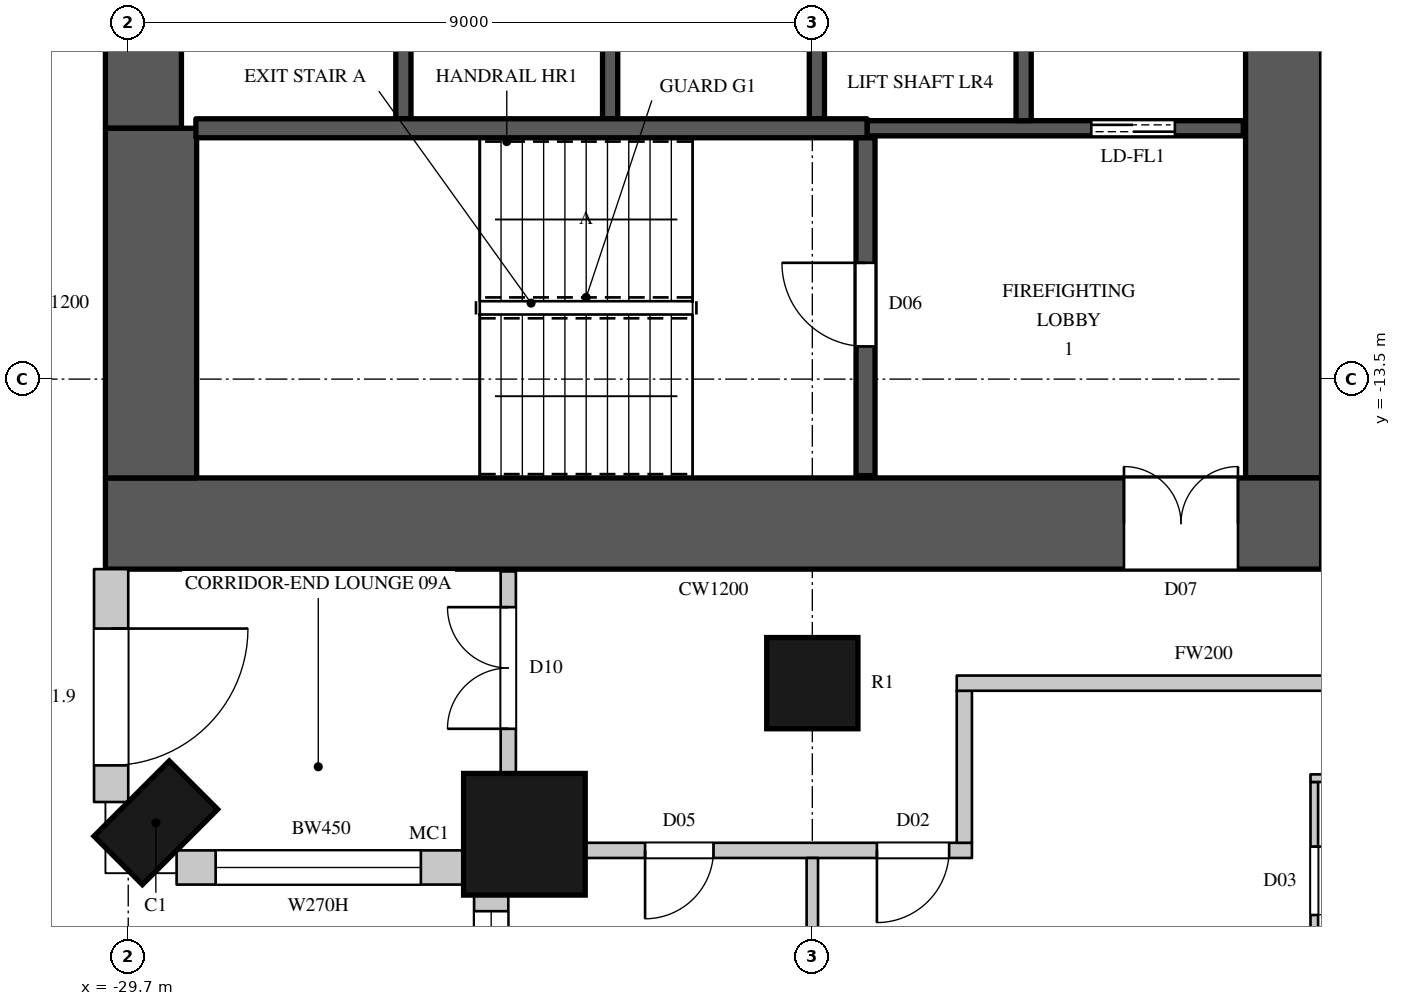
"""IFC4 building model, lengths in metres.
Left out: names, types, materials, properties, quantities, classifications, styles, units other than length and angle.
Written with IfcOpenShell. Run it as: python <this file> out.ifc"""

import sys

from ifc_helpers import new_model, si_unit, direction, frame, frame_2d, origin, origin_2d, place, context, subcontext, project, spatial, rectangle, circle, extrude, element, fill, save


model = new_model("IFC4")
c1 = context("Model", 3, precision=1e-05, world=origin(), true_north=direction((0.0, 1.0)))
c2 = subcontext(c1, "Body", "Model", "MODEL_VIEW")
j1 = project(units=[si_unit("LENGTHUNIT", "METRE"), si_unit("PLANEANGLEUNIT", "RADIAN")], contexts=[c1])
p1 = place(None, origin())
s1 = spatial("IfcSite", under=j1, at=p1, CompositionType="ELEMENT")
p2 = place(p1, origin())
s2 = spatial("IfcBuilding", under=s1, at=p2, CompositionType="ELEMENT")
p3 = place(p2, frame((0.0, 0.0, 62.7)))
s3 = spatial("IfcBuildingStorey", under=s2, at=p3, CompositionType="ELEMENT", Elevation=62.7)
p4 = place(p3, frame((-29.337, -19.337, 0.0), z_axis=(0.0, 0.0, 1.0), x_axis=(0.707106781187, -0.707106781187, 0.0)))
e1 = element("IfcColumn", 1, at=p4, inside=s3, PredefinedType="COLUMN", context=c2, shape_type="SweptSolid", body=[
    extrude(rectangle(XDim=0.9, YDim=1.4, at=origin_2d()), origin(), (0.0, 0.0, 1.0), 3.6),
])
p5 = place(p3, frame((-24.488, -19.488, 0.0), z_axis=(0.0, 0.0, 1.0), x_axis=(1.0, 0.0, 0.0)))
e2 = element("IfcColumn", 2, at=p5, inside=s3, PredefinedType="COLUMN", context=c2, shape_type="SweptSolid", body=[
    extrude(circle(Radius=0.8, at=origin_2d()), origin(), (0.0, 0.0, 1.0), 3.6),
])
p6 = place(p3, frame((-20.7, -17.5, 0.0), z_axis=(0.0, 0.0, 1.0), x_axis=(1.0, 0.0, 0.0)))
e3 = element("IfcColumn", 3, at=p6, inside=s3, PredefinedType="COLUMN", context=c2, shape_type="SweptSolid", body=[
    extrude(circle(Radius=0.6, at=origin_2d()), origin(), (0.0, 0.0, 1.0), 3.6),
])
p7 = place(p3, frame((-29.925, -16.0, 0.0), z_axis=(0.0, 0.0, 1.0), x_axis=(0.0, -1.0, 0.0)))
e4 = element("IfcWall", 4, at=p7, inside=s3, PredefinedType="SOLIDWALL", context=c2, shape_type="SweptSolid", body=[
    extrude(rectangle(XDim=3.064, YDim=0.45, at=frame_2d((1.532, 0.0))), origin(), (0.0, 0.0, 1.0), 3.3),
])
p8 = place(p7, frame((0.782, 0.0, 0.0)))
e5 = element("IfcOpeningElement", 5, at=p8, cuts=e4, PredefinedType="OPENING", context=c2, shape_type="SweptSolid", body=[
    extrude(rectangle(XDim=1.8, YDim=2.4, at=frame_2d((0.9, 1.2))), frame((0.0, 0.235, 0.0), z_axis=(0.0, -1.0, 0.0), x_axis=(1.0, 0.0, 0.0)), (0.0, 0.0, 1.0), 0.47),
])
p9 = place(p3, frame((-29.064, -19.925, 0.0), z_axis=(0.0, 0.0, 1.0), x_axis=(1.0, 0.0, 0.0)))
e6 = element("IfcWall", 6, at=p9, inside=s3, PredefinedType="SOLIDWALL", context=c2, shape_type="SweptSolid", body=[
    extrude(rectangle(XDim=3.805, YDim=0.45, at=frame_2d((1.903, 0.0))), origin(), (0.0, 0.0, 1.0), 3.3),
])
p10 = place(p9, frame((0.514, 0.0, 1.05)))
e7 = element("IfcOpeningElement", 7, at=p10, cuts=e6, PredefinedType="OPENING", context=c2, shape_type="SweptSolid", body=[
    extrude(rectangle(XDim=2.7, YDim=2.0, at=frame_2d((1.35, 1.0))), frame((0.0, 0.235, 0.0), z_axis=(0.0, -1.0, 0.0), x_axis=(1.0, 0.0, 0.0)), (0.0, 0.0, 1.0), 0.47),
])
p11 = place(p3, frame((-24.925, -20.259, 0.0), z_axis=(0.0, 0.0, 1.0), x_axis=(0.0, -1.0, 0.0)))
e8 = element("IfcWall", 8, at=p11, inside=s3, PredefinedType="SOLIDWALL", context=c2, shape_type="SweptSolid", body=[
    extrude(rectangle(XDim=1.792, YDim=0.45, at=frame_2d((0.896, 0.0))), origin(), (0.0, 0.0, 1.0), 3.3),
])
p12 = place(p11, frame((0.241, 0.0, 1.05)))
e9 = element("IfcOpeningElement", 9, at=p12, cuts=e8, PredefinedType="OPENING", context=c2, shape_type="SweptSolid", body=[
    extrude(rectangle(XDim=1.2, YDim=2.0, at=frame_2d((0.6, 1.0))), frame((0.0, 0.235, 0.0), z_axis=(0.0, -1.0, 0.0), x_axis=(1.0, 0.0, 0.0)), (0.0, 0.0, 1.0), 0.47),
])
p13 = place(p3, frame((-30.0, -15.4, 0.0), z_axis=(0.0, 0.0, 1.0), x_axis=(1.0, 0.0, 0.0)))
e10 = element("IfcWall", 10, at=p13, inside=s3, PredefinedType="SHEAR", context=c2, shape_type="SweptSolid", body=[
    extrude(rectangle(XDim=16.0, YDim=1.2, at=frame_2d((8.0, 0.0))), origin(), (0.0, 0.0, 1.0), 3.6),
])
p14 = place(p13, frame((13.4, 0.0, 0.0)))
e11 = element("IfcOpeningElement", 11, at=p14, cuts=e10, PredefinedType="OPENING", context=c2, shape_type="SweptSolid", body=[
    extrude(rectangle(XDim=1.5, YDim=2.4, at=frame_2d((0.75, 1.2))), frame((0.0, 0.61, 0.0), z_axis=(0.0, -1.0, 0.0), x_axis=(1.0, 0.0, 0.0)), (0.0, 0.0, 1.0), 1.22),
])
p15 = place(p3, frame((-14.5, -14.8, 0.0), z_axis=(0.0, 0.0, 1.0), x_axis=(0.0, 1.0, 0.0)))
e12 = element("IfcWall", 12, at=p15, inside=s3, PredefinedType="SHEAR", context=c2, shape_type="SweptSolid", body=[
    extrude(rectangle(XDim=29.6, YDim=1.0, at=frame_2d((14.8, 0.0))), origin(), (0.0, 0.0, 1.0), 3.6),
])
p16 = place(p15, frame((8.45, 0.0, 0.0)))
e13 = element("IfcOpeningElement", 13, at=p16, cuts=e12, PredefinedType="OPENING", context=c2, shape_type="SweptSolid", body=[
    extrude(rectangle(XDim=1.5, YDim=2.4, at=frame_2d((0.75, 1.2))), frame((0.0, 0.51, 0.0), z_axis=(0.0, -1.0, 0.0), x_axis=(1.0, 0.0, 0.0)), (0.0, 0.0, 1.0), 1.02),
])
p17 = place(p15, frame((19.65, 0.0, 0.0)))
e14 = element("IfcOpeningElement", 14, at=p17, cuts=e12, PredefinedType="OPENING", context=c2, shape_type="SweptSolid", body=[
    extrude(rectangle(XDim=1.5, YDim=2.4, at=frame_2d((0.75, 1.2))), frame((0.0, 0.51, 0.0), z_axis=(0.0, -1.0, 0.0), x_axis=(1.0, 0.0, 0.0)), (0.0, 0.0, 1.0), 1.02),
])
p18 = place(p15, frame((14.5, 0.0, 0.0)))
e15 = element("IfcOpeningElement", 15, at=p18, cuts=e12, PredefinedType="OPENING", context=c2, shape_type="SweptSolid", body=[
    extrude(rectangle(XDim=0.6, YDim=2.0, at=frame_2d((0.3, 1.0))), frame((0.0, 0.51, 0.0), z_axis=(0.0, -1.0, 0.0), x_axis=(1.0, 0.0, 0.0)), (0.0, 0.0, 1.0), 1.02),
])
p19 = place(p3, frame((-29.5, -10.2, 0.0), z_axis=(0.0, 0.0, 1.0), x_axis=(0.0, 1.0, 0.0)))
e16 = element("IfcWall", 16, at=p19, inside=s3, PredefinedType="SHEAR", context=c2, shape_type="SweptSolid", body=[
    extrude(rectangle(XDim=20.4, YDim=1.0, at=frame_2d((10.2, 0.0))), origin(), (0.0, 0.0, 1.0), 3.6),
])
p20 = place(p3, frame((-29.4, -14.8, 0.0), z_axis=(0.0, 0.0, 1.0), x_axis=(0.0, 1.0, 0.0)))
e17 = element("IfcWall", 17, at=p20, inside=s3, PredefinedType="SHEAR", context=c2, shape_type="SweptSolid", body=[
    extrude(rectangle(XDim=4.6, YDim=1.2, at=frame_2d((2.3, 0.0))), origin(), (0.0, 0.0, 1.0), 3.6),
])
p21 = place(p3, frame((-24.7, -18.7, 0.0), z_axis=(0.0, 0.0, 1.0), x_axis=(0.0, 1.0, 0.0)))
e18 = element("IfcWall", 18, at=p21, inside=s3, PredefinedType="PARTITIONING", context=c2, shape_type="SweptSolid", body=[
    extrude(rectangle(XDim=2.67, YDim=0.2, at=frame_2d((1.335, 0.0))), origin(), (0.0, 0.0, 1.0), 3.3),
])
p22 = place(p21, frame((0.6, 0.0, 0.0)))
e19 = element("IfcOpeningElement", 19, at=p22, cuts=e18, PredefinedType="OPENING", context=c2, shape_type="SweptSolid", body=[
    extrude(rectangle(XDim=1.6, YDim=2.4, at=frame_2d((0.8, 1.2))), frame((0.0, 0.11, 0.0), z_axis=(0.0, -1.0, 0.0), x_axis=(1.0, 0.0, 0.0)), (0.0, 0.0, 1.0), 0.22),
])
p23 = place(p3, frame((-23.7, -19.7, 0.0), z_axis=(0.0, 0.0, 1.0), x_axis=(1.0, 0.0, 0.0)))
e20 = element("IfcWall", 20, at=p23, inside=s3, PredefinedType="PARTITIONING", context=c2, shape_type="SweptSolid", body=[
    extrude(rectangle(XDim=5.1, YDim=0.2, at=frame_2d((2.55, 0.0))), origin(), (0.0, 0.0, 1.0), 3.3),
])
p24 = place(p23, frame((0.8, 0.0, 0.0)))
e21 = element("IfcOpeningElement", 21, at=p24, cuts=e20, PredefinedType="OPENING", context=c2, shape_type="SweptSolid", body=[
    extrude(rectangle(XDim=0.9, YDim=2.2, at=frame_2d((0.45, 1.1))), frame((0.0, 0.11, 0.0), z_axis=(0.0, -1.0, 0.0), x_axis=(1.0, 0.0, 0.0)), (0.0, 0.0, 1.0), 0.22),
])
p25 = place(p23, frame((3.85, 0.0, 0.0)))
e22 = element("IfcOpeningElement", 22, at=p25, cuts=e20, PredefinedType="OPENING", context=c2, shape_type="SweptSolid", body=[
    extrude(rectangle(XDim=0.95, YDim=2.2, at=frame_2d((0.475, 1.1))), frame((0.0, 0.11, 0.0), z_axis=(0.0, -1.0, 0.0), x_axis=(1.0, 0.0, 0.0)), (0.0, 0.0, 1.0), 0.22),
])
p26 = place(p3, frame((-18.7, -19.6, 0.0), z_axis=(0.0, 0.0, 1.0), x_axis=(0.0, 1.0, 0.0)))
e23 = element("IfcWall", 23, at=p26, inside=s3, PredefinedType="PARTITIONING", context=c2, shape_type="SweptSolid", body=[
    extrude(rectangle(XDim=2.0, YDim=0.2, at=frame_2d((1.0, 0.0))), origin(), (0.0, 0.0, 1.0), 3.3),
])
p27 = place(p3, frame((-18.8, -17.5, 0.0), z_axis=(0.0, 0.0, 1.0), x_axis=(1.0, 0.0, 0.0)))
e24 = element("IfcWall", 24, at=p27, inside=s3, PredefinedType="PARTITIONING", context=c2, shape_type="SweptSolid", body=[
    extrude(rectangle(XDim=6.5, YDim=0.2, at=frame_2d((3.25, 0.0))), origin(), (0.0, 0.0, 1.0), 2.75),
])
p28 = place(p3, frame((-20.7, -24.75, 0.0), z_axis=(0.0, 0.0, 1.0), x_axis=(0.0, 1.0, 0.0)))
e25 = element("IfcWall", 25, at=p28, inside=s3, PredefinedType="PARTITIONING", context=c2, shape_type="SweptSolid", body=[
    extrude(rectangle(XDim=4.95, YDim=0.15, at=frame_2d((2.475, 0.0))), origin(), (0.0, 0.0, 1.0), 2.75),
])
for number, where, z_axis, x_axis in (
    (26, (-26.08, -10.075, 0.0), (0.0, 0.0, 1.0), (0.0, 1.0, 0.0)),
    (27, (-23.36, -10.075, 0.0), (0.0, 0.0, 1.0), (0.0, 1.0, 0.0)),
    (28, (-20.64, -10.075, 0.0), (0.0, 0.0, 1.0), (0.0, 1.0, 0.0)),
):
    element("IfcWall", number, at=place(p3, frame(where, z_axis=z_axis, x_axis=x_axis)), inside=s3, PredefinedType="SHEAR", context=c2, shape_type="SweptSolid", body=[
        extrude(rectangle(XDim=2.575, YDim=0.2, at=frame_2d((1.288, 0.0))), origin(), (0.0, 0.0, 1.0), 3.6),
    ])
p29 = place(p3, frame((-19.98, -10.2, 0.0), z_axis=(0.0, 0.0, 1.0), x_axis=(1.0, 0.0, 0.0)))
e29 = element("IfcWall", 29, at=p29, inside=s3, PredefinedType="SHEAR", context=c2, shape_type="SweptSolid", body=[
    extrude(rectangle(XDim=4.95, YDim=0.2, at=frame_2d((2.475, 0.0))), origin(), (0.0, 0.0, 1.0), 3.3),
])
p30 = place(p29, frame((2.95, 0.0, 0.0)))
e30 = element("IfcOpeningElement", 30, at=p30, cuts=e29, PredefinedType="OPENING", context=c2, shape_type="SweptSolid", body=[
    extrude(rectangle(XDim=1.1, YDim=2.2, at=frame_2d((0.55, 1.1))), frame((0.0, 0.11, 0.0), z_axis=(0.0, -1.0, 0.0), x_axis=(1.0, 0.0, 0.0)), (0.0, 0.0, 1.0), 0.22),
])
p31 = place(p3, frame((-17.92, -10.1, 0.0), z_axis=(0.0, 0.0, 1.0), x_axis=(0.0, 1.0, 0.0)))
e31 = element("IfcWall", 31, at=p31, inside=s3, PredefinedType="SHEAR", context=c2, shape_type="SweptSolid", body=[
    extrude(rectangle(XDim=2.6, YDim=0.2, at=frame_2d((1.3, 0.0))), origin(), (0.0, 0.0, 1.0), 3.6),
])
p32 = place(p3, frame((-28.81, -10.2, 0.0), z_axis=(0.0, 0.0, 1.0), x_axis=(1.0, 0.0, 0.0)))
e32 = element("IfcWall", 32, at=p32, inside=s3, PredefinedType="SHEAR", context=c2, shape_type="SweptSolid", body=[
    extrude(rectangle(XDim=8.83, YDim=0.25, at=frame_2d((4.415, 0.0))), origin(), (0.0, 0.0, 1.0), 3.3),
])
p33 = place(p3, frame((-20.0, -14.77, 0.0), z_axis=(0.0, 0.0, 1.0), x_axis=(0.0, 1.0, 0.0)))
e33 = element("IfcWall", 33, at=p33, inside=s3, PredefinedType="SHEAR", context=c2, shape_type="SweptSolid", body=[
    extrude(rectangle(XDim=4.445, YDim=0.25, at=frame_2d((2.223, 0.0))), origin(), (0.0, 0.0, 1.0), 3.3),
])
p34 = place(p33, frame((1.7, 0.0, 0.0)))
e34 = element("IfcOpeningElement", 34, at=p34, cuts=e33, PredefinedType="OPENING", context=c2, shape_type="SweptSolid", body=[
    extrude(rectangle(XDim=1.1, YDim=2.2, at=frame_2d((0.55, 1.1))), frame((0.0, 0.135, 0.0), z_axis=(0.0, -1.0, 0.0), x_axis=(1.0, 0.0, 0.0)), (0.0, 0.0, 1.0), 0.27),
])
p35 = place(p3, frame((-14.096, -21.4, 0.0), z_axis=(0.0, 0.0, 1.0), x_axis=(0.0, 1.0, 0.0)))
e35 = element("IfcWall", 35, at=p35, inside=s3, PredefinedType="PARTITIONING", context=c2, shape_type="SweptSolid", body=[
    extrude(rectangle(XDim=2.6, YDim=0.1, at=frame_2d((1.3, 0.0))), origin(), (0.0, 0.0, 1.0), 3.3),
])
p36 = place(p35, frame((0.85, 0.0, 0.0)))
e36 = element("IfcOpeningElement", 36, at=p36, cuts=e35, PredefinedType="OPENING", context=c2, shape_type="SweptSolid", body=[
    extrude(rectangle(XDim=0.9, YDim=2.2, at=frame_2d((0.45, 1.1))), frame((0.0, 0.06, 0.0), z_axis=(0.0, -1.0, 0.0), x_axis=(1.0, 0.0, 0.0)), (0.0, 0.0, 1.0), 0.12),
])
p37 = place(p3, frame((-14.146, -18.75, 0.0), z_axis=(0.0, 0.0, 1.0), x_axis=(1.0, 0.0, 0.0)))
e37 = element("IfcWall", 37, at=p37, inside=s3, PredefinedType="PARTITIONING", context=c2, shape_type="SweptSolid", body=[
    extrude(rectangle(XDim=4.892, YDim=0.1, at=frame_2d((2.446, 0.0))), origin(), (0.0, 0.0, 1.0), 3.3),
])
p38 = place(p8, origin())
e38 = element("IfcDoor", 38, at=p38, inside=s3, OperationType="SLIDING_TO_LEFT", PredefinedType="DOOR", context=c2, shape_type="SweptSolid", body=[
    extrude(rectangle(XDim=1.8, YDim=2.4, at=frame_2d((0.9, 1.2))), frame((0.0, 0.13, 0.0), z_axis=(0.0, -1.0, 0.0), x_axis=(1.0, 0.0, 0.0)), (0.0, 0.0, 1.0), 0.05),
])
fill(e5, e38)
p39 = place(p10, origin())
e39 = element("IfcWindow", 39, at=p39, inside=s3, PartitioningType="SINGLE_PANEL", PredefinedType="WINDOW", context=c2, shape_type="SweptSolid", body=[
    extrude(rectangle(XDim=2.7, YDim=2.0, at=frame_2d((1.35, 1.0))), frame((0.0, 0.135, 0.0), z_axis=(0.0, -1.0, 0.0), x_axis=(1.0, 0.0, 0.0)), (0.0, 0.0, 1.0), 0.06),
])
fill(e7, e39)
p40 = place(p12, origin())
e40 = element("IfcWindow", 40, at=p40, inside=s3, PartitioningType="SINGLE_PANEL", PredefinedType="WINDOW", context=c2, shape_type="SweptSolid", body=[
    extrude(rectangle(XDim=1.2, YDim=2.0, at=frame_2d((0.6, 1.0))), frame((0.0, 0.135, 0.0), z_axis=(0.0, -1.0, 0.0), x_axis=(1.0, 0.0, 0.0)), (0.0, 0.0, 1.0), 0.06),
])
fill(e9, e40)
p41 = place(p34, origin())
e41 = element("IfcDoor", 41, at=p41, inside=s3, OperationType="SINGLE_SWING_RIGHT", PredefinedType="DOOR", context=c2, shape_type="SweptSolid", body=[
    extrude(rectangle(XDim=1.1, YDim=2.2, at=frame_2d((0.55, 1.1))), frame((0.0, 0.025, 0.0), z_axis=(0.0, -1.0, 0.0), x_axis=(1.0, 0.0, 0.0)), (0.0, 0.0, 1.0), 0.05),
])
fill(e34, e41)
p42 = place(p30, origin())
e42 = element("IfcDoor", 42, at=p42, inside=s3, OperationType="DOUBLE_DOOR_SLIDING", PredefinedType="DOOR", context=c2, shape_type="SweptSolid", body=[
    extrude(rectangle(XDim=1.1, YDim=2.2, at=frame_2d((0.55, 1.1))), frame((0.0, 0.025, 0.0), z_axis=(0.0, -1.0, 0.0), x_axis=(1.0, 0.0, 0.0)), (0.0, 0.0, 1.0), 0.05),
])
fill(e30, e42)
p43 = place(p24, origin())
e43 = element("IfcDoor", 43, at=p43, inside=s3, OperationType="SINGLE_SWING_RIGHT", PredefinedType="DOOR", context=c2, shape_type="SweptSolid", body=[
    extrude(rectangle(XDim=0.9, YDim=2.2, at=frame_2d((0.45, 1.1))), frame((0.0, 0.025, 0.0), z_axis=(0.0, -1.0, 0.0), x_axis=(1.0, 0.0, 0.0)), (0.0, 0.0, 1.0), 0.05),
])
fill(e21, e43)
p44 = place(p22, origin())
e44 = element("IfcDoor", 44, at=p44, inside=s3, OperationType="DOUBLE_DOOR_SINGLE_SWING", PredefinedType="DOOR", context=c2, shape_type="SweptSolid", body=[
    extrude(rectangle(XDim=1.6, YDim=2.4, at=frame_2d((0.8, 1.2))), frame((0.0, 0.025, 0.0), z_axis=(0.0, -1.0, 0.0), x_axis=(1.0, 0.0, 0.0)), (0.0, 0.0, 1.0), 0.05),
])
fill(e19, e44)
p45 = place(p25, origin())
e45 = element("IfcDoor", 45, at=p45, inside=s3, OperationType="SINGLE_SWING_RIGHT", PredefinedType="DOOR", context=c2, shape_type="SweptSolid", body=[
    extrude(rectangle(XDim=0.95, YDim=2.2, at=frame_2d((0.475, 1.1))), frame((0.0, 0.025, 0.0), z_axis=(0.0, -1.0, 0.0), x_axis=(1.0, 0.0, 0.0)), (0.0, 0.0, 1.0), 0.05),
])
fill(e22, e45)
p46 = place(p36, origin())
e46 = element("IfcDoor", 46, at=p46, inside=s3, OperationType="SINGLE_SWING_LEFT", PredefinedType="DOOR", context=c2, shape_type="SweptSolid", body=[
    extrude(rectangle(XDim=0.9, YDim=2.2, at=frame_2d((0.45, 1.1))), frame((0.0, 0.025, 0.0), z_axis=(0.0, -1.0, 0.0), x_axis=(1.0, 0.0, 0.0)), (0.0, 0.0, 1.0), 0.05),
])
fill(e36, e46)
p47 = place(p14, origin())
e47 = element("IfcDoor", 47, at=p47, inside=s3, OperationType="DOUBLE_DOOR_SINGLE_SWING", PredefinedType="DOOR", context=c2, shape_type="SweptSolid", body=[
    extrude(rectangle(XDim=1.5, YDim=2.4, at=frame_2d((0.75, 1.2))), frame((0.0, 0.025, 0.0), z_axis=(0.0, -1.0, 0.0), x_axis=(1.0, 0.0, 0.0)), (0.0, 0.0, 1.0), 0.05),
])
fill(e11, e47)
save(model, sys.argv[1])
